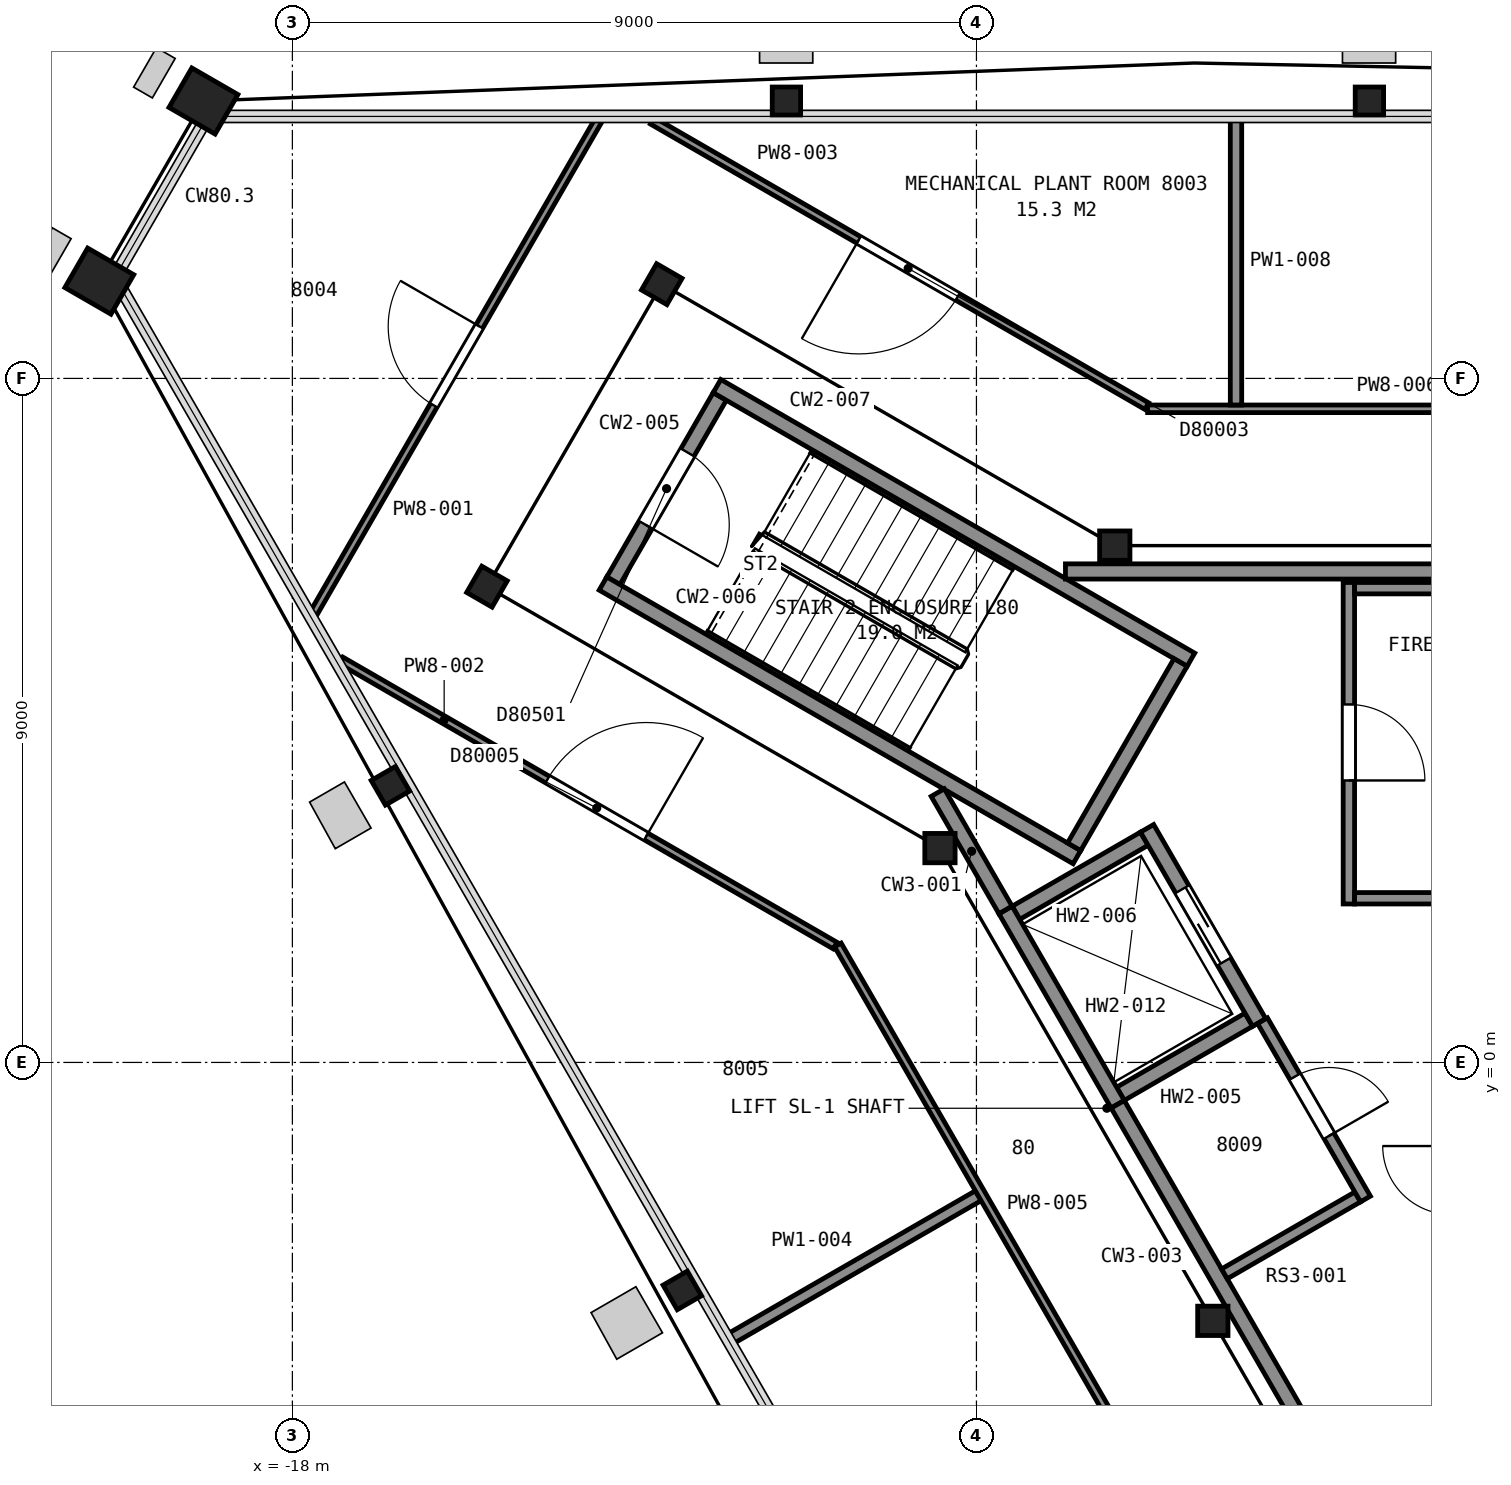
"""IFC4 building model, lengths in metres.
Left out: names, types, materials, properties, quantities, classifications, styles, units other than length and angle.
Written with IfcOpenShell. Run it as: python <this file> out.ifc"""

import sys

from ifc_helpers import new_model, si_unit, direction, frame, frame_2d, origin, origin_2d, place, context, subcontext, project, spatial, rectangle, hollow_rectangle, i_section, extrude, element, fill, save


model = new_model("IFC4")
c1 = context("Model", 3, precision=1e-05, world=origin(), true_north=direction((0.0, 1.0)))
c2 = subcontext(c1, "Body", "Model", "MODEL_VIEW")
j1 = project(units=[si_unit("LENGTHUNIT", "METRE"), si_unit("PLANEANGLEUNIT", "RADIAN")], contexts=[c1])
p1 = place(None, origin())
s1 = spatial("IfcSite", under=j1, at=p1, CompositionType="ELEMENT")
p2 = place(p1, origin())
s2 = spatial("IfcBuilding", under=s1, at=p2, CompositionType="ELEMENT")
p3 = place(p2, frame((0.0, 0.0, 316.8)))
s3 = spatial("IfcBuildingStorey", under=s2, at=p3, CompositionType="ELEMENT", Elevation=316.8)
for number, where, z_axis, x_axis in (
    (1, (-3.83, 12.65, 0.0), (0.0, 0.0, 1.0), (1.0, 0.0, 0.0)),
    (2, (-11.5, 12.65, 0.0), (0.0, 0.0, 1.0), (1.0, 0.0, 0.0)),
):
    element("IfcColumn", number, at=place(p3, frame(where, z_axis=z_axis, x_axis=x_axis)), inside=s3, PredefinedType="COLUMN", context=c2, shape_type="SweptSolid", body=[
        extrude(i_section(OverallWidth=0.373, OverallDepth=0.368, WebThickness=0.015, FlangeThickness=0.024, FilletRadius=0.015, at=origin_2d()), origin(), (0.0, 0.0, 1.0), 4.2),
    ])
for number, where, z_axis, x_axis in (
    (3, (-19.17, 12.65, 0.0), (0.0, 0.0, 1.0), (0.5, 0.866, 0.0)),
    (4, (-20.54, 10.28, 0.0), (0.0, 0.0, 1.0), (0.5, 0.866, 0.0)),
):
    element("IfcColumn", number, at=place(p3, frame(where, z_axis=z_axis, x_axis=x_axis)), inside=s3, PredefinedType="COLUMN", context=c2, shape_type="SweptSolid", body=[
        extrude(hollow_rectangle(XDim=0.6, YDim=0.7, WallThickness=0.04, at=origin_2d()), origin(), (0.0, 0.0, 1.0), 4.2),
    ])
for number, where, z_axis, x_axis in (
    (5, (-16.71, 3.64, 0.0), (0.0, 0.0, 1.0), (-0.5, 0.866, 0.0)),
    (6, (-12.87, -3.0, 0.0), (0.0, 0.0, 1.0), (-0.5, 0.866, 0.0)),
):
    element("IfcColumn", number, at=place(p3, frame(where, z_axis=z_axis, x_axis=x_axis)), inside=s3, PredefinedType="COLUMN", context=c2, shape_type="SweptSolid", body=[
        extrude(i_section(OverallWidth=0.373, OverallDepth=0.368, WebThickness=0.015, FlangeThickness=0.024, FilletRadius=0.015, at=origin_2d()), origin(), (0.0, 0.0, 1.0), 4.2),
    ])
for number, where, z_axis, x_axis in (
    (7, (-7.18, 6.8, 0.0), (0.0, 0.0, 1.0), (1.0, 0.0, 0.0)),
    (8, (-13.14, 10.24, 0.0), (0.0, 0.0, 1.0), (0.5, 0.866, 0.0)),
    (9, (-15.44, 6.26, 0.0), (0.0, 0.0, 1.0), (0.5, 0.866, 0.0)),
    (10, (-9.48, 2.82, 0.0), (0.0, 0.0, 1.0), (1.0, 0.0, 0.0)),
    (11, (-5.89, -3.4, 0.0), (0.0, 0.0, 1.0), (1.0, 0.0, 0.0)),
):
    element("IfcColumn", number, at=place(p3, frame(where, z_axis=z_axis, x_axis=x_axis)), inside=s3, PredefinedType="COLUMN", context=c2, shape_type="SweptSolid", body=[
        extrude(i_section(OverallWidth=0.399, OverallDepth=0.386, WebThickness=0.021, FlangeThickness=0.033, FilletRadius=0.015, at=origin_2d()), origin(), (0.0, 0.0, 1.0), 4.2),
    ])
p4 = place(p3, frame((-12.377, 8.762, 0.0), z_axis=(0.0, 0.0, 1.0), x_axis=(-0.500049511043, -0.865996816683, 0.0)))
e12 = element("IfcWall", 12, at=p4, inside=s3, PredefinedType="PARTITIONING", context=c2, shape_type="SweptSolid", body=[
    extrude(rectangle(XDim=2.8, YDim=0.2, at=frame_2d((1.4, 0.0))), origin(), (0.0, 0.0, 1.0), 3.95),
])
p5 = place(p4, frame((0.85, 0.0, 0.0)))
e13 = element("IfcOpeningElement", 13, at=p5, cuts=e12, PredefinedType="OPENING", context=c2, shape_type="SweptSolid", body=[
    extrude(rectangle(XDim=1.1, YDim=2.1, at=frame_2d((0.55, 1.05))), frame((0.0, 0.11, 0.0), z_axis=(0.0, -1.0, 0.0), x_axis=(1.0, 0.0, 0.0)), (0.0, 0.0, 1.0), 0.22),
])
for number, where, z_axis, x_axis in (
    (14, (-7.678, 2.701, 0.0), (0.0, 0.0, 1.0), (-0.866, 0.5, 0.0)),
    (15, (-6.178, 5.299, 0.0), (0.0, 0.0, 1.0), (-0.866, 0.5, 0.0)),
):
    element("IfcWall", number, at=place(p3, frame(where, z_axis=z_axis, x_axis=x_axis)), inside=s3, PredefinedType="PARTITIONING", context=c2, shape_type="SweptSolid", body=[
        extrude(rectangle(XDim=7.2, YDim=0.2, at=frame_2d((3.6, 0.0))), origin(), (0.0, 0.0, 1.0), 3.95),
    ])
p6 = place(p3, frame((-6.315, 5.262, 0.0), z_axis=(0.0, 0.0, 1.0), x_axis=(-0.500049511043, -0.865996816683, 0.0)))
e16 = element("IfcWall", 16, at=p6, inside=s3, PredefinedType="PARTITIONING", context=c2, shape_type="SweptSolid", body=[
    extrude(rectangle(XDim=2.8, YDim=0.2, at=frame_2d((1.4, 0.0))), origin(), (0.0, 0.0, 1.0), 3.95),
])
for number, where, z_axis, x_axis in (
    (17, (-7.105, -0.413, 0.0), (0.0, 0.0, 1.0), (0.866, 0.5, 0.0)),
    (18, (-8.48, 1.969, 0.0), (0.0, 0.0, 1.0), (0.866, 0.5, 0.0)),
):
    element("IfcWall", number, at=place(p3, frame(where, z_axis=z_axis, x_axis=x_axis)), inside=s3, PredefinedType="PARTITIONING", context=c2, shape_type="SweptSolid", body=[
        extrude(rectangle(XDim=1.95, YDim=0.2, at=frame_2d((0.975, 0.0))), origin(), (0.0, 0.0, 1.0), 4.2),
    ])
p7 = place(p3, frame((-5.28, 0.525, 0.0), z_axis=(0.0, 0.0, 1.0), x_axis=(-0.500037662692, 0.866003658127, 0.0)))
e19 = element("IfcWall", 19, at=p7, inside=s3, PredefinedType="PARTITIONING", context=c2, shape_type="SweptSolid", body=[
    extrude(rectangle(XDim=2.95, YDim=0.2, at=frame_2d((1.475, 0.0))), origin(), (0.0, 0.0, 1.0), 4.2),
])
p8 = place(p7, frame((0.925, 0.0, 0.0)))
e20 = element("IfcOpeningElement", 20, at=p8, cuts=e19, PredefinedType="OPENING", context=c2, shape_type="SweptSolid", body=[
    extrude(rectangle(XDim=1.1, YDim=2.1, at=frame_2d((0.55, 1.05))), frame((0.0, 0.11, 0.0), z_axis=(0.0, -1.0, 0.0), x_axis=(1.0, 0.0, 0.0)), (0.0, 0.0, 1.0), 0.22),
])
p9 = place(p3, frame((-7.142, -0.55, 0.0), z_axis=(0.0, 0.0, 1.0), x_axis=(-0.49997559174, 0.866039495442, 0.0)))
e21 = element("IfcWall", 21, at=p9, inside=s3, PredefinedType="PARTITIONING", context=c2, shape_type="SweptSolid", body=[
    extrude(rectangle(XDim=2.95, YDim=0.2, at=frame_2d((1.475, 0.0))), origin(), (0.0, 0.0, 1.0), 4.2),
])
p10 = place(p3, frame((-9.509, 3.551, 0.0), z_axis=(0.0, 0.0, 1.0), x_axis=(0.499999136801, -0.866025902152, 0.0)))
e22 = element("IfcWall", 22, at=p10, inside=s3, PredefinedType="PARTITIONING", context=c2, shape_type="SweptSolid", body=[
    extrude(rectangle(XDim=1.782, YDim=0.2, at=frame_2d((0.891, 0.0))), origin(), (0.0, 0.0, 1.0), 3.95),
])
p11 = place(p3, frame((7.829, 6.46, 0.0), z_axis=(0.0, 0.0, 1.0), x_axis=(-1.0, 0.0, 0.0)))
e23 = element("IfcWall", 23, at=p11, inside=s3, PredefinedType="PARTITIONING", context=c2, shape_type="SweptSolid", body=[
    extrude(rectangle(XDim=15.658, YDim=0.2, at=frame_2d((7.829, 0.0))), origin(), (0.0, 0.0, 1.0), 3.95),
])
p12 = place(p11, frame((2.618, 0.0, 0.0)))
e24 = element("IfcOpeningElement", 24, at=p12, cuts=e23, PredefinedType="OPENING", context=c2, shape_type="SweptSolid", body=[
    extrude(rectangle(XDim=1.8, YDim=2.1, at=frame_2d((0.9, 1.05))), frame((0.0, 0.11, 0.0), z_axis=(0.0, -1.0, 0.0), x_axis=(1.0, 0.0, 0.0)), (0.0, 0.0, 1.0), 0.22),
])
p13 = place(p3, frame((-7.141, -0.551, 0.0), z_axis=(0.0, 0.0, 1.0), x_axis=(0.499992795234, -0.866029563418, 0.0)))
e25 = element("IfcWall", 25, at=p13, inside=s3, PredefinedType="PARTITIONING", context=c2, shape_type="SweptSolid", body=[
    extrude(rectangle(XDim=9.198, YDim=0.2, at=frame_2d((4.599, 0.0))), origin(), (0.0, 0.0, 1.0), 3.95),
])
p14 = place(p13, frame((4.634, 0.0, 0.0)))
e26 = element("IfcOpeningElement", 26, at=p14, cuts=e25, PredefinedType="OPENING", context=c2, shape_type="SweptSolid", body=[
    extrude(rectangle(XDim=1.8, YDim=2.1, at=frame_2d((0.9, 1.05))), frame((0.0, 0.11, 0.0), z_axis=(0.0, -1.0, 0.0), x_axis=(1.0, 0.0, 0.0)), (0.0, 0.0, 1.0), 0.22),
])
p15 = place(p3, frame((-5.737, -2.782, 0.0), z_axis=(0.0, 0.0, 1.0), x_axis=(0.866000843773, 0.500042536776, 0.0)))
e27 = element("IfcWall", 27, at=p15, inside=s3, PredefinedType="PARTITIONING", context=c2, shape_type="SweptSolid", body=[
    extrude(rectangle(XDim=2.025, YDim=0.15, at=frame_2d((1.012, 0.0))), origin(), (0.0, 0.0, 1.0), 3.95),
])
p16 = place(p3, frame((-3.882, -1.797, 0.0), z_axis=(0.0, 0.0, 1.0), x_axis=(-0.500016307898, 0.86601598821, 0.0)))
e28 = element("IfcWall", 28, at=p16, inside=s3, PredefinedType="PARTITIONING", context=c2, shape_type="SweptSolid", body=[
    extrude(rectangle(XDim=2.709, YDim=0.15, at=frame_2d((1.354, 0.0))), origin(), (0.0, 0.0, 1.0), 3.95),
])
p17 = place(p16, frame((0.959, 0.0, 0.0)))
e29 = element("IfcOpeningElement", 29, at=p17, cuts=e28, PredefinedType="OPENING", context=c2, shape_type="SweptSolid", body=[
    extrude(rectangle(XDim=0.9, YDim=2.1, at=frame_2d((0.45, 1.05))), frame((0.0, 0.085, 0.0), z_axis=(0.0, -1.0, 0.0), x_axis=(1.0, 0.0, 0.0)), (0.0, 0.0, 1.0), 0.17),
])
p18 = place(p3, frame((-4.1, 2.085, 0.0), z_axis=(0.0, 0.0, 1.0), x_axis=(0.0, 1.0, 0.0)))
e30 = element("IfcWall", 30, at=p18, inside=s3, PredefinedType="PARTITIONING", context=c2, shape_type="SweptSolid", body=[
    extrude(rectangle(XDim=4.23, YDim=0.15, at=frame_2d((2.115, 0.0))), origin(), (0.0, 0.0, 1.0), 3.95),
])
p19 = place(p18, frame((1.625, 0.0, 0.0)))
e31 = element("IfcOpeningElement", 31, at=p19, cuts=e30, PredefinedType="OPENING", context=c2, shape_type="SweptSolid", body=[
    extrude(rectangle(XDim=1.0, YDim=2.1, at=frame_2d((0.5, 1.05))), frame((0.0, 0.085, 0.0), z_axis=(0.0, -1.0, 0.0), x_axis=(1.0, 0.0, 0.0)), (0.0, 0.0, 1.0), 0.17),
])
p20 = place(p3, frame((-4.025, 2.16, 0.0), z_axis=(0.0, 0.0, 1.0), x_axis=(1.0, 0.0, 0.0)))
e32 = element("IfcWall", 32, at=p20, inside=s3, PredefinedType="PARTITIONING", context=c2, shape_type="SweptSolid", body=[
    extrude(rectangle(XDim=1.238, YDim=0.15, at=frame_2d((0.619, 0.0))), origin(), (0.0, 0.0, 1.0), 3.95),
])
p21 = place(p3, frame((-4.025, 6.24, 0.0), z_axis=(0.0, 0.0, 1.0), x_axis=(1.0, 0.0, 0.0)))
e33 = element("IfcWall", 33, at=p21, inside=s3, PredefinedType="PARTITIONING", context=c2, shape_type="SweptSolid", body=[
    extrude(rectangle(XDim=3.63, YDim=0.15, at=frame_2d((1.815, 0.0))), origin(), (0.0, 0.0, 1.0), 3.95),
])
p22 = place(p3, frame((-0.101, -4.395, 0.0), z_axis=(0.0, 0.0, 1.0), x_axis=(-0.866045745349, -0.499964765721, 0.0)))
e34 = element("IfcWall", 34, at=p22, inside=s3, PredefinedType="PARTITIONING", context=c2, shape_type="SweptSolid", body=[
    extrude(rectangle(XDim=4.07, YDim=0.15, at=frame_2d((2.035, 0.0))), origin(), (0.0, 0.0, 1.0), 3.95),
])
p23 = place(p22, frame((1.575, 0.0, 0.0)))
e35 = element("IfcOpeningElement", 35, at=p23, cuts=e34, PredefinedType="OPENING", context=c2, shape_type="SweptSolid", body=[
    extrude(rectangle(XDim=0.9, YDim=2.1, at=frame_2d((0.45, 1.05))), frame((0.0, 0.085, 0.0), z_axis=(0.0, -1.0, 0.0), x_axis=(1.0, 0.0, 0.0)), (0.0, 0.0, 1.0), 0.17),
])
p24 = place(p3, frame((-17.73, 5.894, 0.0), z_axis=(0.0, 0.0, 1.0), x_axis=(0.500350572687, 0.865822905918, 0.0)))
e36 = element("IfcWall", 36, at=p24, inside=s3, PredefinedType="PARTITIONING", context=c2, shape_type="SweptSolid", body=[
    extrude(rectangle(XDim=7.524, YDim=0.1, at=frame_2d((3.762, 0.0))), origin(), (0.0, 0.0, 1.0), 3.297),
])
p25 = place(p24, frame((3.179, 0.0, 0.0)))
e37 = element("IfcOpeningElement", 37, at=p25, cuts=e36, PredefinedType="OPENING", context=c2, shape_type="SweptSolid", body=[
    extrude(rectangle(XDim=1.2, YDim=2.1, at=frame_2d((0.6, 1.05))), frame((0.0, 0.06, 0.0), z_axis=(0.0, -1.0, 0.0), x_axis=(1.0, 0.0, 0.0)), (0.0, 0.0, 1.0), 0.12),
])
p26 = place(p3, frame((-10.859, 1.537, 0.0), z_axis=(0.0, 0.0, 1.0), x_axis=(-0.866105995393, 0.499860385252, 0.0)))
e38 = element("IfcWall", 38, at=p26, inside=s3, PredefinedType="PARTITIONING", context=c2, shape_type="SweptSolid", body=[
    extrude(rectangle(XDim=7.508, YDim=0.1, at=frame_2d((3.754, 0.0))), origin(), (0.0, 0.0, 1.0), 3.297),
])
p27 = place(p26, frame((2.872, 0.0, 0.0)))
e39 = element("IfcOpeningElement", 39, at=p27, cuts=e38, PredefinedType="OPENING", context=c2, shape_type="SweptSolid", body=[
    extrude(rectangle(XDim=1.5, YDim=2.1, at=frame_2d((0.75, 1.05))), frame((0.0, 0.06, 0.0), z_axis=(0.0, -1.0, 0.0), x_axis=(1.0, 0.0, 0.0)), (0.0, 0.0, 1.0), 0.12),
])
p28 = place(p3, frame((-13.265, 12.391, 0.0), z_axis=(0.0, 0.0, 1.0), x_axis=(0.866073029218, -0.499917501255, 0.0)))
e40 = element("IfcWall", 40, at=p28, inside=s3, PredefinedType="PARTITIONING", context=c2, shape_type="SweptSolid", body=[
    extrude(rectangle(XDim=7.512, YDim=0.1, at=frame_2d((3.756, 0.0))), origin(), (0.0, 0.0, 1.0), 3.297),
])
p29 = place(p28, frame((3.137, 0.0, 0.0)))
e41 = element("IfcOpeningElement", 41, at=p29, cuts=e40, PredefinedType="OPENING", context=c2, shape_type="SweptSolid", body=[
    extrude(rectangle(XDim=1.5, YDim=2.1, at=frame_2d((0.75, 1.05))), frame((0.0, 0.06, 0.0), z_axis=(0.0, -1.0, 0.0), x_axis=(1.0, 0.0, 0.0)), (0.0, 0.0, 1.0), 0.12),
])
p30 = place(p3, frame((-12.252, -3.645, 0.0), z_axis=(0.0, 0.0, 1.0), x_axis=(0.866034027923, 0.499985062256, 0.0)))
e42 = element("IfcWall", 42, at=p30, inside=s3, PredefinedType="PARTITIONING", context=c2, shape_type="SweptSolid", body=[
    extrude(rectangle(XDim=3.782, YDim=0.15, at=frame_2d((1.891, 0.0))), origin(), (0.0, 0.0, 1.0), 3.297),
])
p31 = place(p3, frame((-4.075, -10.145, 0.0), z_axis=(0.0, 0.0, 1.0), x_axis=(-0.499912942625, 0.866075660549, 0.0)))
e43 = element("IfcWall", 43, at=p31, inside=s3, PredefinedType="PARTITIONING", context=c2, shape_type="SweptSolid", body=[
    extrude(rectangle(XDim=13.499, YDim=0.1, at=frame_2d((6.749, 0.0))), origin(), (0.0, 0.0, 1.0), 3.297),
])
p32 = place(p31, frame((4.117, 0.0, 0.0)))
e44 = element("IfcOpeningElement", 44, at=p32, cuts=e43, PredefinedType="OPENING", context=c2, shape_type="SweptSolid", body=[
    extrude(rectangle(XDim=1.5, YDim=2.1, at=frame_2d((0.75, 1.05))), frame((0.0, 0.06, 0.0), z_axis=(0.0, -1.0, 0.0), x_axis=(1.0, 0.0, 0.0)), (0.0, 0.0, 1.0), 0.12),
])
p33 = place(p3, frame((-6.748, 8.6, 0.0), z_axis=(0.0, 0.0, 1.0), x_axis=(1.0, 0.0, 0.0)))
e45 = element("IfcWall", 45, at=p33, inside=s3, PredefinedType="PARTITIONING", context=c2, shape_type="SweptSolid", body=[
    extrude(rectangle(XDim=13.496, YDim=0.1, at=frame_2d((6.748, 0.0))), origin(), (0.0, 0.0, 1.0), 3.297),
])
p34 = place(p33, frame((6.563, 0.0, 0.0)))
e46 = element("IfcOpeningElement", 46, at=p34, cuts=e45, PredefinedType="OPENING", context=c2, shape_type="SweptSolid", body=[
    extrude(rectangle(XDim=1.5, YDim=2.1, at=frame_2d((0.75, 1.05))), frame((0.0, 0.06, 0.0), z_axis=(0.0, -1.0, 0.0), x_axis=(1.0, 0.0, 0.0)), (0.0, 0.0, 1.0), 0.12),
])
p35 = place(p3, frame((-5.585, 8.65, 0.0), z_axis=(0.0, 0.0, 1.0), x_axis=(0.0, 1.0, 0.0)))
e47 = element("IfcWall", 47, at=p35, inside=s3, PredefinedType="PARTITIONING", context=c2, shape_type="SweptSolid", body=[
    extrude(rectangle(XDim=3.783, YDim=0.15, at=frame_2d((1.892, 0.0))), origin(), (0.0, 0.0, 1.0), 3.297),
])
p36 = place(p5, origin())
e48 = element("IfcDoor", 48, at=p36, inside=s3, OperationType="SINGLE_SWING_RIGHT", PredefinedType="DOOR", context=c2, shape_type="SweptSolid", body=[
    extrude(rectangle(XDim=1.1, YDim=2.1, at=frame_2d((0.55, 1.05))), frame((0.0, 0.025, 0.0), z_axis=(0.0, -1.0, 0.0), x_axis=(1.0, 0.0, 0.0)), (0.0, 0.0, 1.0), 0.05),
])
fill(e13, e48)
p37 = place(p8, origin())
e49 = element("IfcDoor", 49, at=p37, inside=s3, OperationType="SLIDING_TO_LEFT", PredefinedType="DOOR", context=c2, shape_type="SweptSolid", body=[
    extrude(rectangle(XDim=1.1, YDim=2.1, at=frame_2d((0.55, 1.05))), frame((0.0, 0.025, 0.0), z_axis=(0.0, -1.0, 0.0), x_axis=(1.0, 0.0, 0.0)), (0.0, 0.0, 1.0), 0.05),
])
fill(e20, e49)
p38 = place(p17, origin())
e50 = element("IfcDoor", 50, at=p38, inside=s3, OperationType="SINGLE_SWING_LEFT", PredefinedType="DOOR", context=c2, shape_type="SweptSolid", body=[
    extrude(rectangle(XDim=0.9, YDim=2.1, at=frame_2d((0.45, 1.05))), frame((0.0, 0.025, 0.0), z_axis=(0.0, -1.0, 0.0), x_axis=(1.0, 0.0, 0.0)), (0.0, 0.0, 1.0), 0.05),
])
fill(e29, e50)
p39 = place(p19, origin())
e51 = element("IfcDoor", 51, at=p39, inside=s3, OperationType="SINGLE_SWING_LEFT", PredefinedType="DOOR", context=c2, shape_type="SweptSolid", body=[
    extrude(rectangle(XDim=1.0, YDim=2.1, at=frame_2d((0.5, 1.05))), frame((0.0, 0.025, 0.0), z_axis=(0.0, -1.0, 0.0), x_axis=(1.0, 0.0, 0.0)), (0.0, 0.0, 1.0), 0.05),
])
fill(e31, e51)
p40 = place(p25, origin())
e52 = element("IfcDoor", 52, at=p40, inside=s3, OperationType="SINGLE_SWING_RIGHT", PredefinedType="DOOR", context=c2, shape_type="SweptSolid", body=[
    extrude(rectangle(XDim=1.2, YDim=2.1, at=frame_2d((0.6, 1.05))), frame((0.0, 0.025, 0.0), z_axis=(0.0, -1.0, 0.0), x_axis=(1.0, 0.0, 0.0)), (0.0, 0.0, 1.0), 0.05),
])
fill(e37, e52)
p41 = place(p27, origin())
e53 = element("IfcDoor", 53, at=p41, inside=s3, OperationType="DOUBLE_DOOR_SINGLE_SWING", PredefinedType="DOOR", context=c2, shape_type="SweptSolid", body=[
    extrude(rectangle(XDim=1.5, YDim=2.1, at=frame_2d((0.75, 1.05))), frame((0.0, 0.025, 0.0), z_axis=(0.0, -1.0, 0.0), x_axis=(1.0, 0.0, 0.0)), (0.0, 0.0, 1.0), 0.05),
])
fill(e39, e53)
p42 = place(p29, origin())
e54 = element("IfcDoor", 54, at=p42, inside=s3, OperationType="DOUBLE_DOOR_SINGLE_SWING", PredefinedType="DOOR", context=c2, shape_type="SweptSolid", body=[
    extrude(rectangle(XDim=1.5, YDim=2.1, at=frame_2d((0.75, 1.05))), frame((0.0, 0.025, 0.0), z_axis=(0.0, -1.0, 0.0), x_axis=(1.0, 0.0, 0.0)), (0.0, 0.0, 1.0), 0.05),
])
fill(e41, e54)
save(model, sys.argv[1])
